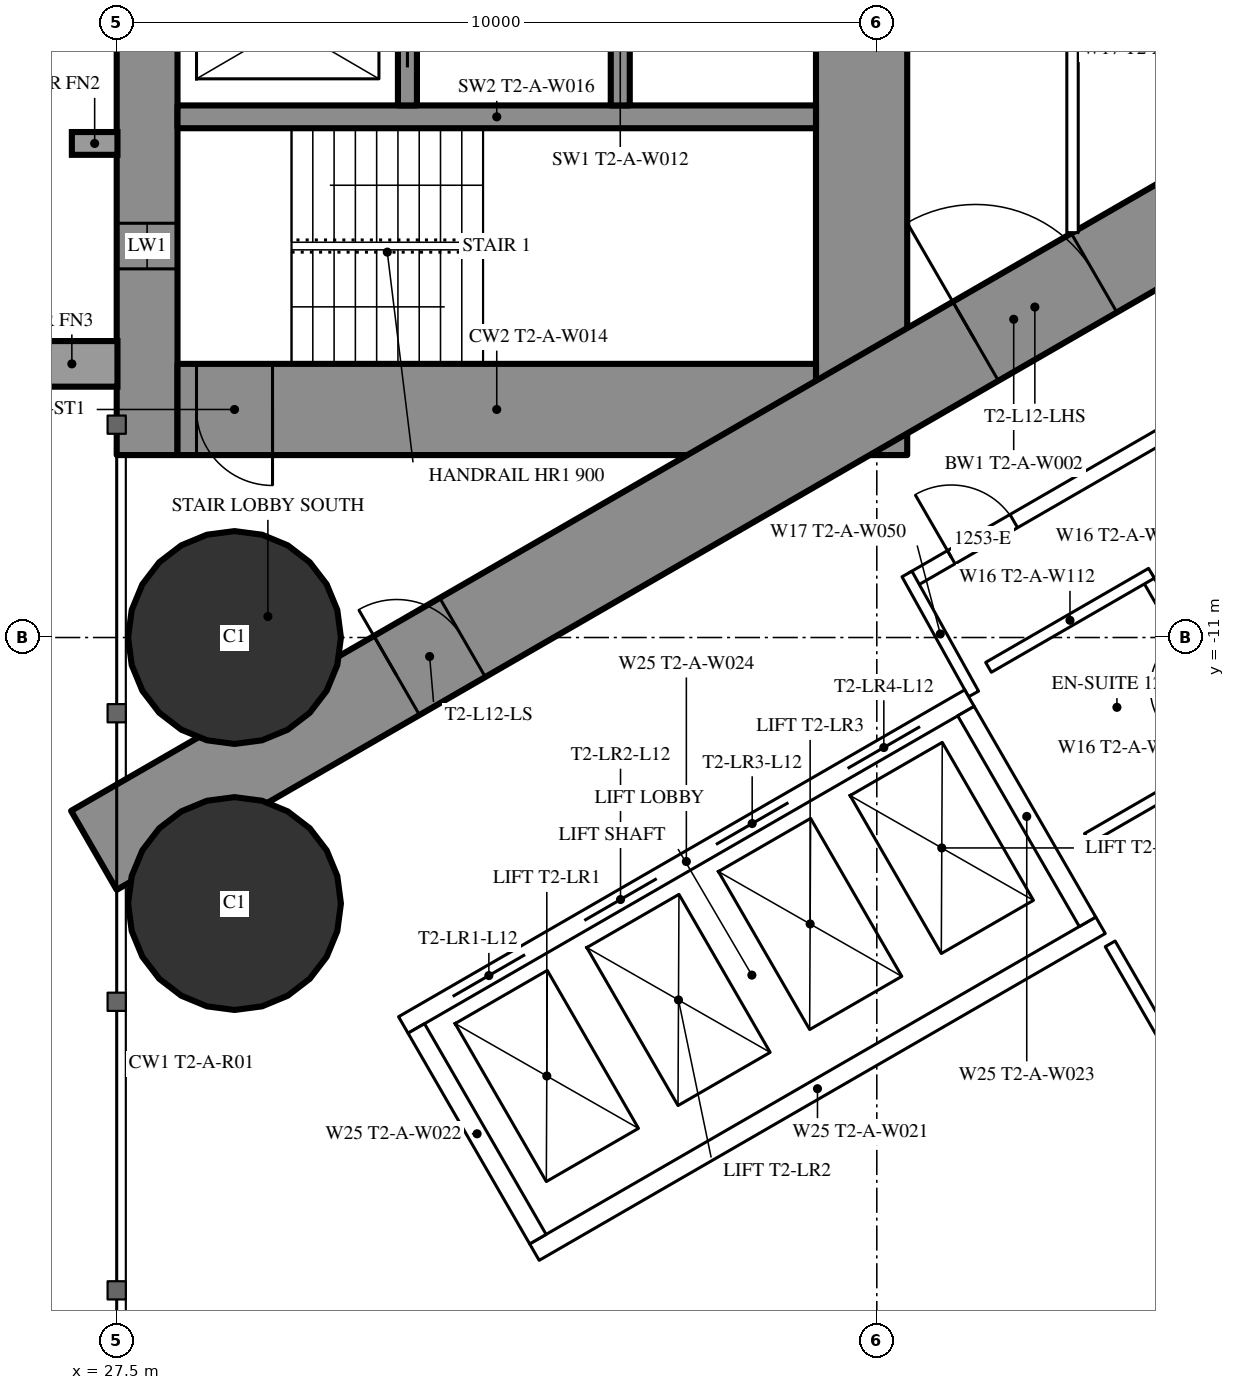
"""IFC4 building model, lengths in metres.
Left out: names, types, materials, properties, quantities, classifications, styles, units other than length and angle.
Written with IfcOpenShell. Run it as: python <this file> out.ifc"""

import sys

from ifc_helpers import new_model, si_unit, direction, frame, frame_2d, origin, origin_2d, place, context, subcontext, project, spatial, rectangle, hollow_circle, extrude, element, fill, save


model = new_model("IFC4")
c1 = context("Model", 3, precision=1e-05, world=origin(), true_north=direction((0.0, 1.0)))
c2 = subcontext(c1, "Body", "Model", "MODEL_VIEW")
j1 = project(units=[si_unit("LENGTHUNIT", "METRE"), si_unit("PLANEANGLEUNIT", "RADIAN")], contexts=[c1])
p1 = place(None, origin())
s1 = spatial("IfcSite", under=j1, at=p1, CompositionType="ELEMENT")
p2 = place(p1, origin())
s2 = spatial("IfcBuilding", under=s1, at=p2, CompositionType="ELEMENT")
p3 = place(p2, frame((0.0, 0.0, 49.5)))
s3 = spatial("IfcBuildingStorey", under=s2, at=p3, CompositionType="ELEMENT", Elevation=49.5)
for number, where, z_axis, x_axis in (
    (1, (29.05, -11.0, 0.0), (0.0, 0.0, 1.0), (1.0, 0.0, 0.0)),
    (2, (29.05, -14.5, 0.0), (0.0, 0.0, 1.0), (1.0, 0.0, 0.0)),
):
    element("IfcColumn", number, at=place(p3, frame(where, z_axis=z_axis, x_axis=x_axis)), inside=s3, PredefinedType="COLUMN", context=c2, shape_type="SweptSolid", body=[
        extrude(hollow_circle(Radius=1.4, WallThickness=0.12, at=origin_2d()), origin(), (0.0, 0.0, 1.0), 3.5),
    ])
p4 = place(p3, frame((27.9, -8.6, 0.0), z_axis=(0.0, 0.0, 1.0), x_axis=(0.0, 1.0, 0.0)))
e3 = element("IfcWall", 3, at=p4, inside=s3, PredefinedType="SHEAR", context=c2, shape_type="SweptSolid", body=[
    extrude(rectangle(XDim=17.2, YDim=0.8, at=frame_2d((8.6, 0.0))), origin(), (0.0, 0.0, 1.0), 3.5),
])
p5 = place(p4, frame((2.45, 0.0, 0.6)))
e4 = element("IfcOpeningElement", 4, at=p5, cuts=e3, PredefinedType="OPENING", context=c2, shape_type="SweptSolid", body=[
    extrude(rectangle(XDim=0.6, YDim=2.1, at=frame_2d((0.3, 1.05))), frame((0.0, 0.41, 0.0), z_axis=(0.0, -1.0, 0.0), x_axis=(1.0, 0.0, 0.0)), (0.0, 0.0, 1.0), 0.82),
])
p6 = place(p4, frame((14.15, 0.0, 0.6)))
e5 = element("IfcOpeningElement", 5, at=p6, cuts=e3, PredefinedType="OPENING", context=c2, shape_type="SweptSolid", body=[
    extrude(rectangle(XDim=0.6, YDim=2.1, at=frame_2d((0.3, 1.05))), frame((0.0, 0.41, 0.0), z_axis=(0.0, -1.0, 0.0), x_axis=(1.0, 0.0, 0.0)), (0.0, 0.0, 1.0), 0.82),
])
p7 = place(p3, frame((37.3, -8.6, 0.0), z_axis=(0.0, 0.0, 1.0), x_axis=(0.0, 1.0, 0.0)))
e6 = element("IfcWall", 6, at=p7, inside=s3, PredefinedType="SHEAR", context=c2, shape_type="SweptSolid", body=[
    extrude(rectangle(XDim=17.2, YDim=1.2, at=frame_2d((8.6, 0.0))), origin(), (0.0, 0.0, 1.0), 3.5),
])
p8 = place(p7, frame((7.7, 0.0, 0.0)))
e7 = element("IfcOpeningElement", 7, at=p8, cuts=e6, PredefinedType="OPENING", context=c2, shape_type="SweptSolid", body=[
    extrude(rectangle(XDim=1.8, YDim=2.2, at=frame_2d((0.9, 1.1))), frame((0.0, 0.61, 0.0), z_axis=(0.0, -1.0, 0.0), x_axis=(1.0, 0.0, 0.0)), (0.0, 0.0, 1.0), 1.22),
])
p9 = place(p3, frame((28.3, -8.0, 0.0), z_axis=(0.0, 0.0, 1.0), x_axis=(1.0, 0.0, 0.0)))
e8 = element("IfcWall", 8, at=p9, inside=s3, PredefinedType="SHEAR", context=c2, shape_type="SweptSolid", body=[
    extrude(rectangle(XDim=8.4, YDim=1.2, at=frame_2d((4.2, 0.0))), origin(), (0.0, 0.0, 1.0), 3.5),
])
p10 = place(p9, frame((0.25, 0.0, 0.0)))
e9 = element("IfcOpeningElement", 9, at=p10, cuts=e8, PredefinedType="OPENING", context=c2, shape_type="SweptSolid", body=[
    extrude(rectangle(XDim=1.0, YDim=2.2, at=frame_2d((0.5, 1.1))), frame((0.0, 0.61, 0.0), z_axis=(0.0, -1.0, 0.0), x_axis=(1.0, 0.0, 0.0)), (0.0, 0.0, 1.0), 1.22),
])
p11 = place(p3, frame((28.3, -4.15, 0.0), z_axis=(0.0, 0.0, 1.0), x_axis=(1.0, 0.0, 0.0)))
e10 = element("IfcWall", 10, at=p11, inside=s3, PredefinedType="SHEAR", context=c2, shape_type="SweptSolid", body=[
    extrude(rectangle(XDim=8.4, YDim=0.3, at=frame_2d((4.2, 0.0))), origin(), (0.0, 0.0, 1.0), 3.5),
])
p12 = place(p3, frame((31.325, -4.0, 0.0), z_axis=(0.0, 0.0, 1.0), x_axis=(0.0, 1.0, 0.0)))
e11 = element("IfcWall", 11, at=p12, inside=s3, PredefinedType="SHEAR", context=c2, shape_type="SweptSolid", body=[
    extrude(rectangle(XDim=2.1, YDim=0.25, at=frame_2d((1.05, 0.0))), origin(), (0.0, 0.0, 1.0), 3.5),
])
p13 = place(p12, frame((0.5, 0.0, 0.0)))
e12 = element("IfcOpeningElement", 12, at=p13, cuts=e11, PredefinedType="OPENING", context=c2, shape_type="SweptSolid", body=[
    extrude(rectangle(XDim=1.1, YDim=2.2, at=frame_2d((0.55, 1.1))), frame((0.0, 0.135, 0.0), z_axis=(0.0, -1.0, 0.0), x_axis=(1.0, 0.0, 0.0)), (0.0, 0.0, 1.0), 0.27),
])
p14 = place(p3, frame((34.125, -4.0, 0.0), z_axis=(0.0, 0.0, 1.0), x_axis=(0.0, 1.0, 0.0)))
e13 = element("IfcWall", 13, at=p14, inside=s3, PredefinedType="SHEAR", context=c2, shape_type="SweptSolid", body=[
    extrude(rectangle(XDim=2.35, YDim=0.25, at=frame_2d((1.175, 0.0))), origin(), (0.0, 0.0, 1.0), 3.5),
])
p15 = place(p14, frame((0.875, 0.0, 0.0)))
e14 = element("IfcOpeningElement", 14, at=p15, cuts=e13, PredefinedType="OPENING", context=c2, shape_type="SweptSolid", body=[
    extrude(rectangle(XDim=0.6, YDim=2.0, at=frame_2d((0.3, 1.0))), frame((0.0, 0.135, 0.0), z_axis=(0.0, -1.0, 0.0), x_axis=(1.0, 0.0, 0.0)), (0.0, 0.0, 1.0), 0.27),
])
p16 = place(p3, frame((27.2, -13.8, 0.0), z_axis=(0.0, 0.0, 1.0), x_axis=(0.866027159892, 0.499996958321, 0.0)))
e15 = element("IfcWall", 15, at=p16, inside=s3, PredefinedType="SHEAR", context=c2, shape_type="SweptSolid", body=[
    extrude(rectangle(XDim=27.947, YDim=1.2, at=frame_2d((13.973, 0.0))), origin(), (0.0, 0.0, 1.0), 3.5),
])
p17 = place(p16, frame((4.6, 0.0, 0.0)))
e16 = element("IfcOpeningElement", 16, at=p17, cuts=e15, PredefinedType="OPENING", context=c2, shape_type="SweptSolid", body=[
    extrude(rectangle(XDim=1.0, YDim=2.2, at=frame_2d((0.5, 1.1))), frame((0.0, 0.61, 0.0), z_axis=(0.0, -1.0, 0.0), x_axis=(1.0, 0.0, 0.0)), (0.0, 0.0, 1.0), 1.22),
])
p18 = place(p16, frame((13.395, 0.0, 0.0)))
e17 = element("IfcOpeningElement", 17, at=p18, cuts=e15, PredefinedType="OPENING", context=c2, shape_type="SweptSolid", body=[
    extrude(rectangle(XDim=1.8, YDim=2.2, at=frame_2d((0.9, 1.1))), frame((0.0, 0.61, 0.0), z_axis=(0.0, -1.0, 0.0), x_axis=(1.0, 0.0, 0.0)), (0.0, 0.0, 1.0), 1.22),
])
p19 = place(p3, frame((40.57, -15.03, 0.0), z_axis=(0.0, 0.0, 1.0), x_axis=(0.500012993597, -0.866017901798, 0.0)))
e18 = element("IfcWall", 18, at=p19, inside=s3, PredefinedType="PARTITIONING", context=c2, shape_type="SweptSolid", body=[
    extrude(rectangle(XDim=4.243, YDim=0.15, at=frame_2d((2.122, 0.0))), origin(), (0.0, 0.0, 1.0), 3.25),
])
p20 = place(p3, frame((37.96, -10.243, 0.0), z_axis=(0.0, 0.0, 1.0), x_axis=(0.866026429433, 0.499998223521, 0.0)))
e19 = element("IfcWall", 19, at=p20, inside=s3, PredefinedType="PARTITIONING", context=c2, shape_type="SweptSolid", body=[
    extrude(rectangle(XDim=20.487, YDim=0.2, at=frame_2d((10.243, 0.0))), origin(), (0.0, 0.0, 1.0), 3.25),
])
p21 = place(p20, frame((6.925, 0.0, 0.0)))
e20 = element("IfcOpeningElement", 20, at=p21, cuts=e19, PredefinedType="OPENING", context=c2, shape_type="SweptSolid", body=[
    extrude(rectangle(XDim=0.95, YDim=2.2, at=frame_2d((0.475, 1.1))), frame((0.0, 0.11, 0.0), z_axis=(0.0, -1.0, 0.0), x_axis=(1.0, 0.0, 0.0)), (0.0, 0.0, 1.0), 0.22),
])
p22 = place(p20, frame((11.549, 0.0, 0.0)))
e21 = element("IfcOpeningElement", 21, at=p22, cuts=e19, PredefinedType="OPENING", context=c2, shape_type="SweptSolid", body=[
    extrude(rectangle(XDim=0.95, YDim=2.2, at=frame_2d((0.475, 1.1))), frame((0.0, 0.11, 0.0), z_axis=(0.0, -1.0, 0.0), x_axis=(1.0, 0.0, 0.0)), (0.0, 0.0, 1.0), 0.22),
])
p23 = place(p20, frame((13.249, 0.0, 0.0)))
e22 = element("IfcOpeningElement", 22, at=p23, cuts=e19, PredefinedType="OPENING", context=c2, shape_type="SweptSolid", body=[
    extrude(rectangle(XDim=0.95, YDim=2.2, at=frame_2d((0.475, 1.1))), frame((0.0, 0.11, 0.0), z_axis=(0.0, -1.0, 0.0), x_axis=(1.0, 0.0, 0.0)), (0.0, 0.0, 1.0), 0.22),
])
p24 = place(p20, frame((17.585, 0.0, 0.0)))
e23 = element("IfcOpeningElement", 23, at=p24, cuts=e19, PredefinedType="OPENING", context=c2, shape_type="SweptSolid", body=[
    extrude(rectangle(XDim=0.95, YDim=2.2, at=frame_2d((0.475, 1.1))), frame((0.0, 0.11, 0.0), z_axis=(0.0, -1.0, 0.0), x_axis=(1.0, 0.0, 0.0)), (0.0, 0.0, 1.0), 0.22),
])
p25 = place(p20, frame((0.6, 0.0, 0.0)))
e24 = element("IfcOpeningElement", 24, at=p25, cuts=e19, PredefinedType="OPENING", context=c2, shape_type="SweptSolid", body=[
    extrude(rectangle(XDim=0.95, YDim=2.2, at=frame_2d((0.475, 1.1))), frame((0.0, 0.11, 0.0), z_axis=(0.0, -1.0, 0.0), x_axis=(1.0, 0.0, 0.0)), (0.0, 0.0, 1.0), 0.22),
])
p26 = place(p3, frame((38.773, -11.742, 0.0), z_axis=(0.0, 0.0, 1.0), x_axis=(-0.485528096672, 0.8742210632, 0.0)))
e25 = element("IfcWall", 25, at=p26, inside=s3, PredefinedType="PARTITIONING", context=c2, shape_type="SweptSolid", body=[
    extrude(rectangle(XDim=1.805, YDim=0.15, at=frame_2d((0.903, 0.0))), origin(), (0.0, 0.0, 1.0), 3.25),
])
p27 = place(p3, frame((40.27, -13.644, 0.0), z_axis=(0.0, 0.0, 1.0), x_axis=(0.866031185235, 0.4999899861, 0.0)))
e26 = element("IfcWall", 26, at=p27, inside=s3, PredefinedType="PARTITIONING", context=c2, shape_type="SweptSolid", body=[
    extrude(rectangle(XDim=2.475, YDim=0.15, at=frame_2d((1.238, 0.0))), origin(), (0.0, 0.0, 1.0), 3.25),
])
p28 = place(p3, frame((41.048, -10.193, 0.0), z_axis=(0.0, 0.0, 1.0), x_axis=(0.500047596559, -0.865997922154, 0.0)))
e27 = element("IfcWall", 27, at=p28, inside=s3, PredefinedType="PARTITIONING", context=c2, shape_type="SweptSolid", body=[
    extrude(rectangle(XDim=2.6, YDim=0.15, at=frame_2d((1.3, 0.0))), origin(), (0.0, 0.0, 1.0), 3.25),
])
p29 = place(p28, frame((0.9, 0.0, 0.0)))
e28 = element("IfcOpeningElement", 28, at=p29, cuts=e27, PredefinedType="OPENING", context=c2, shape_type="SweptSolid", body=[
    extrude(rectangle(XDim=0.8, YDim=2.2, at=frame_2d((0.4, 1.1))), frame((0.0, 0.085, 0.0), z_axis=(0.0, -1.0, 0.0), x_axis=(1.0, 0.0, 0.0)), (0.0, 0.0, 1.0), 0.17),
])
p30 = place(p3, frame((38.97, -11.393, 0.0), z_axis=(0.0, 0.0, 1.0), x_axis=(0.866031185235, 0.4999899861, 0.0)))
e29 = element("IfcWall", 29, at=p30, inside=s3, PredefinedType="PARTITIONING", context=c2, shape_type="SweptSolid", body=[
    extrude(rectangle(XDim=2.475, YDim=0.15, at=frame_2d((1.238, 0.0))), origin(), (0.0, 0.0, 1.0), 3.25),
])
p31 = place(p3, frame((40.075, -5.674, 0.0), z_axis=(0.0, 0.0, 1.0), x_axis=(0.0, 1.0, 0.0)))
e30 = element("IfcWall", 30, at=p31, inside=s3, PredefinedType="PARTITIONING", context=c2, shape_type="SweptSolid", body=[
    extrude(rectangle(XDim=6.874, YDim=0.15, at=frame_2d((3.437, 0.0))), origin(), (0.0, 0.0, 1.0), 3.25),
])
p32 = place(p31, frame((2.537, 0.0, 0.0)))
e31 = element("IfcOpeningElement", 31, at=p32, cuts=e30, PredefinedType="OPENING", context=c2, shape_type="SweptSolid", body=[
    extrude(rectangle(XDim=1.8, YDim=2.2, at=frame_2d((0.9, 1.1))), frame((0.0, 0.085, 0.0), z_axis=(0.0, -1.0, 0.0), x_axis=(1.0, 0.0, 0.0)), (0.0, 0.0, 1.0), 0.17),
])
p33 = place(p3, frame((31.271, -16.097, 0.0), z_axis=(0.0, 0.0, 1.0), x_axis=(0.86604045752, 0.499973925258, 0.0)))
e32 = element("IfcWall", 32, at=p33, inside=s3, PredefinedType="PARTITIONING", context=c2, shape_type="SweptSolid", body=[
    extrude(rectangle(XDim=8.6, YDim=0.25, at=frame_2d((4.3, 0.0))), origin(), (0.0, 0.0, 1.0), 3.25),
])
p34 = place(p33, frame((0.75, 0.0, 0.0)))
e33 = element("IfcOpeningElement", 33, at=p34, cuts=e32, PredefinedType="OPENING", context=c2, shape_type="SweptSolid", body=[
    extrude(rectangle(XDim=1.1, YDim=2.2, at=frame_2d((0.55, 1.1))), frame((0.0, 0.135, 0.0), z_axis=(0.0, -1.0, 0.0), x_axis=(1.0, 0.0, 0.0)), (0.0, 0.0, 1.0), 0.27),
])
p35 = place(p33, frame((2.75, 0.0, 0.0)))
e34 = element("IfcOpeningElement", 34, at=p35, cuts=e32, PredefinedType="OPENING", context=c2, shape_type="SweptSolid", body=[
    extrude(rectangle(XDim=1.1, YDim=2.2, at=frame_2d((0.55, 1.1))), frame((0.0, 0.135, 0.0), z_axis=(0.0, -1.0, 0.0), x_axis=(1.0, 0.0, 0.0)), (0.0, 0.0, 1.0), 0.27),
])
p36 = place(p33, frame((4.75, 0.0, 0.0)))
e35 = element("IfcOpeningElement", 35, at=p36, cuts=e32, PredefinedType="OPENING", context=c2, shape_type="SweptSolid", body=[
    extrude(rectangle(XDim=1.1, YDim=2.2, at=frame_2d((0.55, 1.1))), frame((0.0, 0.135, 0.0), z_axis=(0.0, -1.0, 0.0), x_axis=(1.0, 0.0, 0.0)), (0.0, 0.0, 1.0), 0.27),
])
p37 = place(p33, frame((6.75, 0.0, 0.0)))
e36 = element("IfcOpeningElement", 36, at=p37, cuts=e32, PredefinedType="OPENING", context=c2, shape_type="SweptSolid", body=[
    extrude(rectangle(XDim=1.1, YDim=2.2, at=frame_2d((0.55, 1.1))), frame((0.0, 0.135, 0.0), z_axis=(0.0, -1.0, 0.0), x_axis=(1.0, 0.0, 0.0)), (0.0, 0.0, 1.0), 0.27),
])
p38 = place(p3, frame((32.996, -19.086, 0.0), z_axis=(0.0, 0.0, 1.0), x_axis=(0.866028165386, 0.499995216735, 0.0)))
e37 = element("IfcWall", 37, at=p38, inside=s3, PredefinedType="PARTITIONING", context=c2, shape_type="SweptSolid", body=[
    extrude(rectangle(XDim=8.6, YDim=0.25, at=frame_2d((4.3, 0.0))), origin(), (0.0, 0.0, 1.0), 3.25),
])
for number, where, z_axis, x_axis in (
    (38, (31.441, -16.143, 0.0), (0.0, 0.0, 1.0), (0.5, -0.866, 0.0)),
    (39, (38.673, -11.968, 0.0), (0.0, 0.0, 1.0), (0.5, -0.866, 0.0)),
):
    element("IfcWall", number, at=place(p3, frame(where, z_axis=z_axis, x_axis=x_axis)), inside=s3, PredefinedType="PARTITIONING", context=c2, shape_type="SweptSolid", body=[
        extrude(rectangle(XDim=3.201, YDim=0.25, at=frame_2d((1.6, 0.0))), origin(), (0.0, 0.0, 1.0), 3.25),
    ])
p39 = place(p25, origin())
e40 = element("IfcDoor", 40, at=p39, inside=s3, OperationType="SINGLE_SWING_LEFT", PredefinedType="DOOR", context=c2, shape_type="SweptSolid", body=[
    extrude(rectangle(XDim=0.95, YDim=2.2, at=frame_2d((0.475, 1.1))), frame((0.0, 0.025, 0.0), z_axis=(0.0, -1.0, 0.0), x_axis=(1.0, 0.0, 0.0)), (0.0, 0.0, 1.0), 0.05),
])
fill(e24, e40)
p40 = place(p17, origin())
e41 = element("IfcDoor", 41, at=p40, inside=s3, OperationType="SINGLE_SWING_LEFT", PredefinedType="DOOR", context=c2, shape_type="SweptSolid", body=[
    extrude(rectangle(XDim=1.0, YDim=2.2, at=frame_2d((0.5, 1.1))), frame((0.0, 0.025, 0.0), z_axis=(0.0, -1.0, 0.0), x_axis=(1.0, 0.0, 0.0)), (0.0, 0.0, 1.0), 0.05),
])
fill(e16, e41)
p41 = place(p18, origin())
e42 = element("IfcDoor", 42, at=p41, inside=s3, OperationType="DOUBLE_DOOR_SINGLE_SWING", PredefinedType="DOOR", context=c2, shape_type="SweptSolid", body=[
    extrude(rectangle(XDim=1.8, YDim=2.2, at=frame_2d((0.9, 1.1))), frame((0.0, 0.025, 0.0), z_axis=(0.0, -1.0, 0.0), x_axis=(1.0, 0.0, 0.0)), (0.0, 0.0, 1.0), 0.05),
])
fill(e17, e42)
p42 = place(p10, origin())
e43 = element("IfcDoor", 43, at=p42, inside=s3, OperationType="SINGLE_SWING_RIGHT", PredefinedType="DOOR", context=c2, shape_type="SweptSolid", body=[
    extrude(rectangle(XDim=1.0, YDim=2.2, at=frame_2d((0.5, 1.1))), frame((0.0, 0.025, 0.0), z_axis=(0.0, -1.0, 0.0), x_axis=(1.0, 0.0, 0.0)), (0.0, 0.0, 1.0), 0.05),
])
fill(e9, e43)
p43 = place(p13, origin())
e44 = element("IfcDoor", 44, at=p43, inside=s3, OperationType="SLIDING_TO_LEFT", PredefinedType="USERDEFINED", context=c2, shape_type="SweptSolid", body=[
    extrude(rectangle(XDim=1.1, YDim=2.2, at=frame_2d((0.55, 1.1))), frame((0.0, 0.025, 0.0), z_axis=(0.0, -1.0, 0.0), x_axis=(1.0, 0.0, 0.0)), (0.0, 0.0, 1.0), 0.05),
])
fill(e12, e44)
p44 = place(p34, origin())
e45 = element("IfcDoor", 45, at=p44, inside=s3, OperationType="DOUBLE_DOOR_SLIDING", PredefinedType="USERDEFINED", context=c2, shape_type="SweptSolid", body=[
    extrude(rectangle(XDim=1.1, YDim=2.2, at=frame_2d((0.55, 1.1))), frame((0.0, 0.025, 0.0), z_axis=(0.0, -1.0, 0.0), x_axis=(1.0, 0.0, 0.0)), (0.0, 0.0, 1.0), 0.05),
])
fill(e33, e45)
p45 = place(p35, origin())
e46 = element("IfcDoor", 46, at=p45, inside=s3, OperationType="DOUBLE_DOOR_SLIDING", PredefinedType="USERDEFINED", context=c2, shape_type="SweptSolid", body=[
    extrude(rectangle(XDim=1.1, YDim=2.2, at=frame_2d((0.55, 1.1))), frame((0.0, 0.025, 0.0), z_axis=(0.0, -1.0, 0.0), x_axis=(1.0, 0.0, 0.0)), (0.0, 0.0, 1.0), 0.05),
])
fill(e34, e46)
p46 = place(p36, origin())
e47 = element("IfcDoor", 47, at=p46, inside=s3, OperationType="DOUBLE_DOOR_SLIDING", PredefinedType="USERDEFINED", context=c2, shape_type="SweptSolid", body=[
    extrude(rectangle(XDim=1.1, YDim=2.2, at=frame_2d((0.55, 1.1))), frame((0.0, 0.025, 0.0), z_axis=(0.0, -1.0, 0.0), x_axis=(1.0, 0.0, 0.0)), (0.0, 0.0, 1.0), 0.05),
])
fill(e35, e47)
p47 = place(p37, origin())
e48 = element("IfcDoor", 48, at=p47, inside=s3, OperationType="DOUBLE_DOOR_SLIDING", PredefinedType="USERDEFINED", context=c2, shape_type="SweptSolid", body=[
    extrude(rectangle(XDim=1.1, YDim=2.2, at=frame_2d((0.55, 1.1))), frame((0.0, 0.025, 0.0), z_axis=(0.0, -1.0, 0.0), x_axis=(1.0, 0.0, 0.0)), (0.0, 0.0, 1.0), 0.05),
])
fill(e36, e48)
p48 = place(p5, origin())
e49 = element("IfcWindow", 49, at=p48, inside=s3, PartitioningType="SINGLE_PANEL", PredefinedType="WINDOW", context=c2, shape_type="SweptSolid", body=[
    extrude(rectangle(XDim=0.6, YDim=2.1, at=frame_2d((0.3, 1.05))), frame((0.0, 0.03, 0.0), z_axis=(0.0, -1.0, 0.0), x_axis=(1.0, 0.0, 0.0)), (0.0, 0.0, 1.0), 0.06),
])
fill(e4, e49)
save(model, sys.argv[1])
